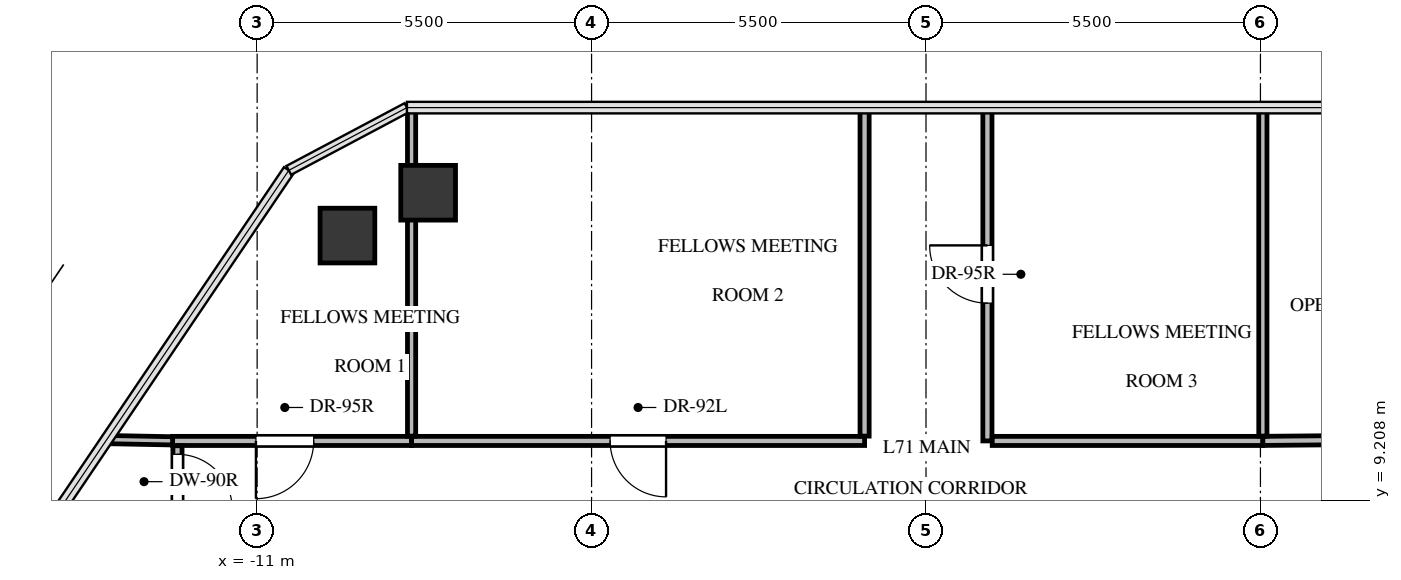
"""IFC4 building model, lengths in metres.
Left out: names, types, materials, properties, quantities, classifications, styles, units other than length and angle.
Written with IfcOpenShell. Run it as: python <this file> out.ifc"""

import sys

from ifc_helpers import new_model, si_unit, direction, frame, frame_2d, origin, origin_2d, place, context, subcontext, project, spatial, rectangle, extrude, source, transform, mapped, element, fill, save


model = new_model("IFC4")
c1 = context("Model", 3, precision=1e-05, world=origin(), true_north=direction((0.0, 1.0)))
c2 = subcontext(c1, "Body", "Model", "MODEL_VIEW")
j1 = project(units=[si_unit("LENGTHUNIT", "METRE"), si_unit("PLANEANGLEUNIT", "RADIAN")], contexts=[c1])
p1 = place(None, origin())
s1 = spatial("IfcSite", under=j1, at=p1, CompositionType="ELEMENT")
p2 = place(p1, origin())
s2 = spatial("IfcBuilding", under=s1, at=p2, CompositionType="ELEMENT")
p3 = place(p2, frame((0.0, 0.0, 254.7)))
s3 = spatial("IfcBuildingStorey", under=s2, at=p3, CompositionType="ELEMENT", Elevation=254.7)
m1 = source(origin(), c2, "Body", "SweptSolid", [
    extrude(rectangle(XDim=0.9, YDim=0.9, at=origin_2d()), origin(), (0.0, 0.0, 1.0), 3.4),
])
for number, where, z_axis, x_axis in (
    (1, (-9.515, 13.557, -0.24), (0.0, 0.0, 1.0), (1.0, 0.0, 0.0)),
    (2, (-8.188, 14.262, -0.24), (0.0, 0.0, 1.0), (1.0, 0.0, 0.0)),
):
    element("IfcColumn", number, at=place(p3, frame(where, z_axis=z_axis, x_axis=x_axis)), inside=s3, PredefinedType="COLUMN", context=c2, shape_type="MappedRepresentation", body=[
        mapped(m1, transform((0.0, 0.0, 0.0), x_axis=(1.0, 0.0, 0.0), y_axis=(0.0, 1.0, 0.0), z_axis=(0.0, 0.0, 1.0), scale=1.0)),
    ])
p4 = place(p3, frame((-8.46, 10.18, 0.0), z_axis=(0.0, 0.0, 1.0), x_axis=(-1.0, 0.0, 0.0)))
e3 = element("IfcWall", 3, at=p4, inside=s3, PredefinedType="PARTITIONING", context=c2, shape_type="SweptSolid", body=[
    extrude(rectangle(XDim=3.93, YDim=0.15, at=frame_2d((1.965, 0.0))), origin(), (0.0, 0.0, 1.0), 2.401),
])
p5 = place(p4, frame((1.61, 0.0, 0.0)))
e4 = element("IfcOpeningElement", 4, at=p5, cuts=e3, PredefinedType="OPENING", context=c2, shape_type="SweptSolid", body=[
    extrude(rectangle(XDim=0.95, YDim=2.1, at=frame_2d((0.475, 1.05))), frame((0.0, 0.085, 0.0), z_axis=(0.0, -1.0, 0.0), x_axis=(1.0, 0.0, 0.0)), (0.0, 0.0, 1.0), 0.17),
])
p6 = place(p3, frame((-1.01, 10.18, 0.0), z_axis=(0.0, 0.0, 1.0), x_axis=(-1.0, 0.0, 0.0)))
e5 = element("IfcWall", 5, at=p6, inside=s3, PredefinedType="PARTITIONING", context=c2, shape_type="SweptSolid", body=[
    extrude(rectangle(XDim=7.45, YDim=0.15, at=frame_2d((3.725, 0.0))), origin(), (0.0, 0.0, 1.0), 2.401),
])
p7 = place(p6, frame((3.265, 0.0, 0.0)))
e6 = element("IfcOpeningElement", 6, at=p7, cuts=e5, PredefinedType="OPENING", context=c2, shape_type="SweptSolid", body=[
    extrude(rectangle(XDim=0.92, YDim=2.1, at=frame_2d((0.46, 1.05))), frame((0.0, 0.085, 0.0), z_axis=(0.0, -1.0, 0.0), x_axis=(1.0, 0.0, 0.0)), (0.0, 0.0, 1.0), 0.17),
])
p8 = place(p3, frame((-1.01, 15.662, 0.0), z_axis=(0.0, 0.0, 1.0), x_axis=(0.0, -1.0, 0.0)))
e7 = element("IfcWall", 7, at=p8, inside=s3, PredefinedType="PARTITIONING", context=c2, shape_type="SweptSolid", body=[
    extrude(rectangle(XDim=5.403, YDim=0.15, at=frame_2d((2.702, 0.0))), origin(), (0.0, 0.0, 1.0), 2.499),
])
p9 = place(p3, frame((1.01, 10.18, 0.0), z_axis=(0.0, 0.0, 1.0), x_axis=(0.0, 1.0, 0.0)))
e8 = element("IfcWall", 8, at=p9, inside=s3, PredefinedType="PARTITIONING", context=c2, shape_type="SweptSolid", body=[
    extrude(rectangle(XDim=5.482, YDim=0.15, at=frame_2d((2.741, 0.0))), origin(), (0.0, 0.0, 1.0), 2.499),
])
p10 = place(p9, frame((2.266, 0.0, 0.0)))
e9 = element("IfcOpeningElement", 9, at=p10, cuts=e8, PredefinedType="OPENING", context=c2, shape_type="SweptSolid", body=[
    extrude(rectangle(XDim=0.95, YDim=2.1, at=frame_2d((0.475, 1.05))), frame((0.0, 0.085, 0.0), z_axis=(0.0, -1.0, 0.0), x_axis=(1.0, 0.0, 0.0)), (0.0, 0.0, 1.0), 0.17),
])
p11 = place(p3, frame((5.54, 10.18, 0.0), z_axis=(0.0, 0.0, 1.0), x_axis=(-1.0, 0.0, 0.0)))
e10 = element("IfcWall", 10, at=p11, inside=s3, PredefinedType="PARTITIONING", context=c2, shape_type="SweptSolid", body=[
    extrude(rectangle(XDim=4.451, YDim=0.15, at=frame_2d((2.226, 0.0))), origin(), (0.0, 0.0, 1.0), 2.708),
])
p12 = place(p3, frame((12.368, 10.243, 0.0), z_axis=(0.0, 0.0, 1.0), x_axis=(-0.999958440586, -0.009116858034, 0.0)))
e11 = element("IfcWall", 11, at=p12, inside=s3, PredefinedType="PARTITIONING", context=c2, shape_type="SweptSolid", body=[
    extrude(rectangle(XDim=6.829, YDim=0.15, at=frame_2d((3.414, 0.0))), origin(), (0.0, 0.0, 1.0), 2.401),
])
p13 = place(p12, frame((2.954, 0.0, 0.0)))
e12 = element("IfcOpeningElement", 12, at=p13, cuts=e11, PredefinedType="OPENING", context=c2, shape_type="SweptSolid", body=[
    extrude(rectangle(XDim=0.92, YDim=2.1, at=frame_2d((0.46, 1.05))), frame((0.0, 0.085, 0.0), z_axis=(0.0, -1.0, 0.0), x_axis=(1.0, 0.0, 0.0)), (0.0, 0.0, 1.0), 0.17),
])
p14 = place(p3, frame((-12.31, 10.101, 0.0), z_axis=(0.0, 0.0, 1.0), x_axis=(0.0, -1.0, 0.0)))
e13 = element("IfcWall", 13, at=p14, inside=s3, PredefinedType="PARTITIONING", context=c2, shape_type="SweptSolid", body=[
    extrude(rectangle(XDim=1.182, YDim=0.15, at=frame_2d((0.591, 0.0))), origin(), (0.0, 0.0, 1.0), 2.499),
])
p15 = place(p14, frame((0.141, 0.0, 0.0)))
e14 = element("IfcOpeningElement", 14, at=p15, cuts=e13, PredefinedType="OPENING", context=c2, shape_type="SweptSolid", body=[
    extrude(rectangle(XDim=0.9, YDim=2.05, at=frame_2d((0.45, 1.025))), frame((0.0, 0.085, 0.0), z_axis=(0.0, -1.0, 0.0), x_axis=(1.0, 0.0, 0.0)), (0.0, 0.0, 1.0), 0.17),
])
p16 = place(p3, frame((-8.46, 14.361, 0.0), z_axis=(0.0, 0.0, 1.0), x_axis=(0.0, -1.0, 0.0)))
e15 = element("IfcWall", 15, at=p16, inside=s3, PredefinedType="PARTITIONING", context=c2, shape_type="SweptSolid", body=[
    extrude(rectangle(XDim=4.102, YDim=0.135, at=frame_2d((2.051, 0.0))), origin(), (0.0, 0.0, 1.0), 2.401),
])
p17 = place(p3, frame((-8.46, 15.662, 0.0), z_axis=(0.0, 0.0, 1.0), x_axis=(0.0, -1.0, 0.0)))
e16 = element("IfcWall", 16, at=p17, inside=s3, PredefinedType="PARTITIONING", context=c2, shape_type="SweptSolid", body=[
    extrude(rectangle(XDim=1.301, YDim=0.135, at=frame_2d((0.65, 0.0))), origin(), (0.0, 0.0, 1.0), 1.977),
])
p18 = place(p3, frame((-12.39, 10.181, 0.0), z_axis=(0.0, 0.0, 1.0), x_axis=(-0.999812128272, 0.019383192748, 0.0)))
e17 = element("IfcWall", 17, at=p18, inside=s3, PredefinedType="PARTITIONING", context=c2, shape_type="SweptSolid", body=[
    extrude(rectangle(XDim=1.083, YDim=0.135, at=frame_2d((0.542, 0.0))), origin(), (0.0, 0.0, 1.0), 3.145),
])
p19 = place(p3, frame((5.54, 15.662, 0.0), z_axis=(0.0, 0.0, 1.0), x_axis=(0.0, -1.0, 0.0)))
e18 = element("IfcWall", 18, at=p19, inside=s3, PredefinedType="PARTITIONING", context=c2, shape_type="SweptSolid", body=[
    extrude(rectangle(XDim=5.402, YDim=0.135, at=frame_2d((2.701, 0.0))), origin(), (0.0, 0.0, 1.0), 2.499),
])
m2 = source(origin(), c2, "Body", "SweptSolid", [
    extrude(rectangle(XDim=0.95, YDim=2.1, at=frame_2d((0.475, 1.05))), frame((0.0, 0.025, 0.0), z_axis=(0.0, -1.0, 0.0), x_axis=(1.0, 0.0, 0.0)), (0.0, 0.0, 1.0), 0.05),
])
p20 = place(p5, origin())
e19 = element("IfcDoor", 19, at=p20, inside=s3, OperationType="SINGLE_SWING_RIGHT", PredefinedType="DOOR", context=c2, shape_type="MappedRepresentation", body=[
    mapped(m2, transform((0.0, 0.0, 0.0), x_axis=(1.0, 0.0, 0.0), y_axis=(0.0, 1.0, 0.0), z_axis=(0.0, 0.0, 1.0), scale=1.0)),
])
fill(e4, e19)
m3 = source(origin(), c2, "Body", "SweptSolid", [
    extrude(rectangle(XDim=0.92, YDim=2.1, at=frame_2d((0.46, 1.05))), frame((0.0, 0.025, 0.0), z_axis=(0.0, -1.0, 0.0), x_axis=(1.0, 0.0, 0.0)), (0.0, 0.0, 1.0), 0.05),
])
p21 = place(p7, origin())
e20 = element("IfcDoor", 20, at=p21, inside=s3, OperationType="SINGLE_SWING_LEFT", PredefinedType="DOOR", context=c2, shape_type="MappedRepresentation", body=[
    mapped(m3, transform((0.0, 0.0, 0.0), x_axis=(1.0, 0.0, 0.0), y_axis=(0.0, 1.0, 0.0), z_axis=(0.0, 0.0, 1.0), scale=1.0)),
])
fill(e6, e20)
p22 = place(p10, origin())
e21 = element("IfcDoor", 21, at=p22, inside=s3, OperationType="SINGLE_SWING_RIGHT", PredefinedType="DOOR", context=c2, shape_type="MappedRepresentation", body=[
    mapped(m2, transform((0.0, 0.0, 0.0), x_axis=(1.0, 0.0, 0.0), y_axis=(0.0, 1.0, 0.0), z_axis=(0.0, 0.0, 1.0), scale=1.0)),
])
fill(e9, e21)
m4 = source(origin(), c2, "Body", "SweptSolid", [
    extrude(rectangle(XDim=0.9, YDim=2.05, at=frame_2d((0.45, 1.025))), frame((0.0, 0.025, 0.0), z_axis=(0.0, -1.0, 0.0), x_axis=(1.0, 0.0, 0.0)), (0.0, 0.0, 1.0), 0.05),
])
p23 = place(p15, origin())
e22 = element("IfcDoor", 22, at=p23, inside=s3, OperationType="SINGLE_SWING_RIGHT", PredefinedType="DOOR", context=c2, shape_type="MappedRepresentation", body=[
    mapped(m4, transform((0.0, 0.0, 0.0), x_axis=(1.0, 0.0, 0.0), y_axis=(0.0, 1.0, 0.0), z_axis=(0.0, 0.0, 1.0), scale=1.0)),
])
fill(e14, e22)
save(model, sys.argv[1])
